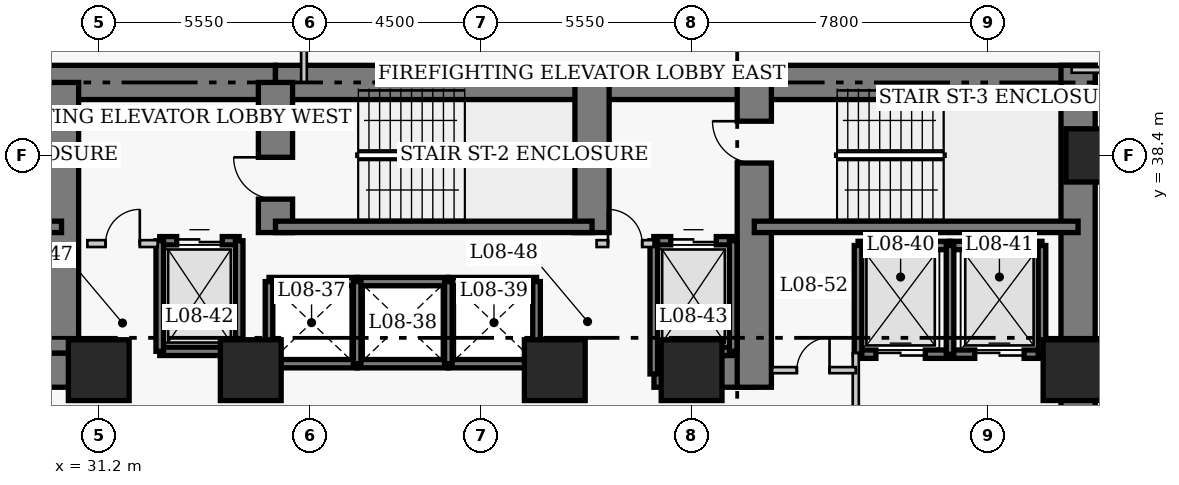
"""IFC4 building model, lengths in metres.
Left out: names, types, materials, properties, quantities, classifications, styles, units other than length and angle.
Written with IfcOpenShell. Run it as: python <this file> out.ifc"""

import sys

from ifc_helpers import new_model, si_unit, direction, frame, frame_2d, origin, origin_2d, place, context, subcontext, project, spatial, rectangle, extrude, element, fill, save


model = new_model("IFC4")
c1 = context("Model", 3, precision=1e-05, world=origin(), true_north=direction((0.0, 1.0)))
c2 = subcontext(c1, "Body", "Model", "MODEL_VIEW")
j1 = project(units=[si_unit("LENGTHUNIT", "METRE"), si_unit("PLANEANGLEUNIT", "RADIAN")], contexts=[c1])
p1 = place(None, origin())
s1 = spatial("IfcSite", under=j1, at=p1, CompositionType="ELEMENT")
p2 = place(p1, origin())
s2 = spatial("IfcBuilding", under=s1, at=p2, CompositionType="ELEMENT")
p3 = place(p2, frame((0.0, 0.0, 37.4)))
s3 = spatial("IfcBuildingStorey", under=s2, at=p3, CompositionType="ELEMENT", Elevation=37.4)
p4 = place(p3, frame((21.45, 40.32, 0.0), z_axis=(0.0, 0.0, 1.0), x_axis=(1.0, 0.0, 0.0)))
e1 = element("IfcWall", 1, at=p4, inside=s3, PredefinedType="SHEAR", context=c2, shape_type="SweptSolid", body=[
    extrude(rectangle(XDim=14.4, YDim=0.9, at=frame_2d((7.2, 0.0))), origin(), (0.0, 0.0, 1.0), 3.8),
])
p5 = place(p3, frame((35.85, 40.32, 0.0), z_axis=(0.0, 0.0, 1.0), x_axis=(1.0, 0.0, 0.0)))
e2 = element("IfcWall", 2, at=p5, inside=s3, PredefinedType="SHEAR", context=c2, shape_type="SweptSolid", body=[
    extrude(rectangle(XDim=12.6, YDim=0.9, at=frame_2d((6.3, 0.0))), origin(), (0.0, 0.0, 1.0), 3.8),
])
p6 = place(p3, frame((48.45, 40.32, 0.0), z_axis=(0.0, 0.0, 1.0), x_axis=(1.0, 0.0, 0.0)))
e3 = element("IfcWall", 3, at=p6, inside=s3, PredefinedType="SHEAR", context=c2, shape_type="SweptSolid", body=[
    extrude(rectangle(XDim=8.97, YDim=0.9, at=frame_2d((4.485, 0.0))), origin(), (0.0, 0.0, 1.0), 3.8),
])
p7 = place(p3, frame((56.97, 27.05, 0.0), z_axis=(0.0, 0.0, 1.0), x_axis=(0.0, 1.0, 0.0)))
e4 = element("IfcWall", 4, at=p7, inside=s3, PredefinedType="SHEAR", context=c2, shape_type="SweptSolid", body=[
    extrude(rectangle(XDim=13.72, YDim=0.9, at=frame_2d((6.86, 0.0))), origin(), (0.0, 0.0, 1.0), 3.8),
])
p8 = place(p3, frame((28.45, 32.75, 0.0), z_axis=(0.0, 0.0, 1.0), x_axis=(1.0, 0.0, 0.0)))
e5 = element("IfcWall", 5, at=p8, inside=s3, PredefinedType="SHEAR", context=c2, shape_type="SweptSolid", body=[
    extrude(rectangle(XDim=2.4, YDim=0.9, at=frame_2d((1.2, 0.0))), origin(), (0.0, 0.0, 1.0), 3.8),
])
p9 = place(p3, frame((45.81, 32.75, 0.0), z_axis=(0.0, 0.0, 1.0), x_axis=(1.0, 0.0, 0.0)))
e6 = element("IfcWall", 6, at=p9, inside=s3, PredefinedType="SHEAR", context=c2, shape_type="SweptSolid", body=[
    extrude(rectangle(XDim=2.64, YDim=0.9, at=frame_2d((1.32, 0.0))), origin(), (0.0, 0.0, 1.0), 3.8),
])
p10 = place(p3, frame((30.22, 33.2, 0.0), z_axis=(0.0, 0.0, 1.0), x_axis=(0.0, 1.0, 0.0)))
e7 = element("IfcWall", 7, at=p10, inside=s3, PredefinedType="SHEAR", context=c2, shape_type="SweptSolid", body=[
    extrude(rectangle(XDim=7.12, YDim=0.9, at=frame_2d((3.56, 0.0))), origin(), (0.0, 0.0, 1.0), 3.8),
])
p11 = place(p3, frame((35.85, 36.37, 0.0), z_axis=(0.0, 0.0, 1.0), x_axis=(0.0, 1.0, 0.0)))
e8 = element("IfcWall", 8, at=p11, inside=s3, PredefinedType="SHEAR", context=c2, shape_type="SweptSolid", body=[
    extrude(rectangle(XDim=3.95, YDim=0.9, at=frame_2d((1.975, 0.0))), origin(), (0.0, 0.0, 1.0), 3.8),
])
p12 = place(p11, frame((0.88, 0.0, 0.0)))
e9 = element("IfcOpeningElement", 9, at=p12, cuts=e8, PredefinedType="OPENING", context=c2, shape_type="SweptSolid", body=[
    extrude(rectangle(XDim=1.1, YDim=2.15, at=frame_2d((0.55, 1.075))), frame((0.0, 0.46, 0.0), z_axis=(0.0, -1.0, 0.0), x_axis=(1.0, 0.0, 0.0)), (0.0, 0.0, 1.0), 0.92),
])
p13 = place(p3, frame((44.18, 36.37, 0.0), z_axis=(0.0, 0.0, 1.0), x_axis=(0.0, 1.0, 0.0)))
e10 = element("IfcWall", 10, at=p13, inside=s3, PredefinedType="SHEAR", context=c2, shape_type="SweptSolid", body=[
    extrude(rectangle(XDim=3.95, YDim=0.9, at=frame_2d((1.975, 0.0))), origin(), (0.0, 0.0, 1.0), 3.8),
])
p14 = place(p3, frame((48.45, 32.3, 0.0), z_axis=(0.0, 0.0, 1.0), x_axis=(0.0, 1.0, 0.0)))
e11 = element("IfcWall", 11, at=p14, inside=s3, PredefinedType="SHEAR", context=c2, shape_type="SweptSolid", body=[
    extrude(rectangle(XDim=8.02, YDim=0.9, at=frame_2d((4.01, 0.0))), origin(), (0.0, 0.0, 1.0), 3.8),
])
p15 = place(p14, frame((5.9, 0.0, 0.0)))
e12 = element("IfcOpeningElement", 12, at=p15, cuts=e11, PredefinedType="OPENING", context=c2, shape_type="SweptSolid", body=[
    extrude(rectangle(XDim=1.1, YDim=2.15, at=frame_2d((0.55, 1.075))), frame((0.0, 0.46, 0.0), z_axis=(0.0, -1.0, 0.0), x_axis=(1.0, 0.0, 0.0)), (0.0, 0.0, 1.0), 0.92),
])
p16 = place(p3, frame((21.9, 36.52, 0.0), z_axis=(0.0, 0.0, 1.0), x_axis=(1.0, 0.0, 0.0)))
e13 = element("IfcWall", 13, at=p16, inside=s3, PredefinedType="SHEAR", context=c2, shape_type="SweptSolid", body=[
    extrude(rectangle(XDim=8.32, YDim=0.3, at=frame_2d((4.16, 0.0))), origin(), (0.0, 0.0, 1.0), 3.8),
])
p17 = place(p16, frame((0.9, 0.0, 0.0)))
e14 = element("IfcOpeningElement", 14, at=p17, cuts=e13, PredefinedType="OPENING", context=c2, shape_type="SweptSolid", body=[
    extrude(rectangle(XDim=1.1, YDim=2.15, at=frame_2d((0.55, 1.075))), frame((0.0, 0.16, 0.0), z_axis=(0.0, -1.0, 0.0), x_axis=(1.0, 0.0, 0.0)), (0.0, 0.0, 1.0), 0.32),
])
p18 = place(p3, frame((35.85, 36.52, 0.0), z_axis=(0.0, 0.0, 1.0), x_axis=(1.0, 0.0, 0.0)))
e15 = element("IfcWall", 15, at=p18, inside=s3, PredefinedType="SHEAR", context=c2, shape_type="SweptSolid", body=[
    extrude(rectangle(XDim=8.33, YDim=0.3, at=frame_2d((4.165, 0.0))), origin(), (0.0, 0.0, 1.0), 3.8),
])
p19 = place(p3, frame((48.45, 36.52, 0.0), z_axis=(0.0, 0.0, 1.0), x_axis=(1.0, 0.0, 0.0)))
e16 = element("IfcWall", 16, at=p19, inside=s3, PredefinedType="SHEAR", context=c2, shape_type="SweptSolid", body=[
    extrude(rectangle(XDim=8.52, YDim=0.3, at=frame_2d((4.26, 0.0))), origin(), (0.0, 0.0, 1.0), 3.8),
])
p20 = place(p3, frame((57.35, 38.4, 0.0), z_axis=(0.0, 0.0, 1.0), x_axis=(1.0, 0.0, 0.0)))
e17 = element("IfcColumn", 17, at=p20, inside=s3, PredefinedType="COLUMN", context=c2, shape_type="SweptSolid", body=[
    extrude(rectangle(XDim=1.4, YDim=1.4, at=origin_2d()), origin(), (0.0, 0.0, 1.0), 3.8),
])
for number, where, z_axis, x_axis in (
    (18, (31.2, 32.75, 0.0), (0.0, 0.0, 1.0), (1.0, 0.0, 0.0)),
    (19, (35.2, 32.75, 0.0), (0.0, 0.0, 1.0), (1.0, 0.0, 0.0)),
    (20, (43.2, 32.75, 0.0), (0.0, 0.0, 1.0), (1.0, 0.0, 0.0)),
    (21, (46.8, 32.75, 0.0), (0.0, 0.0, 1.0), (1.0, 0.0, 0.0)),
    (22, (56.85, 32.75, 0.0), (0.0, 0.0, 1.0), (1.0, 0.0, 0.0)),
):
    element("IfcColumn", number, at=place(p3, frame(where, z_axis=z_axis, x_axis=x_axis)), inside=s3, PredefinedType="COLUMN", context=c2, shape_type="SweptSolid", body=[
        extrude(rectangle(XDim=1.6, YDim=1.6, at=origin_2d()), origin(), (0.0, 0.0, 1.0), 3.8),
    ])
for number, where, z_axis, x_axis in (
    (23, (35.68, 35.08, 0.0), (0.0, 0.0, 1.0), (1.0, 0.0, 0.0)),
    (24, (35.68, 32.92, 0.0), (0.0, 0.0, 1.0), (1.0, 0.0, 0.0)),
):
    element("IfcWall", number, at=place(p3, frame(where, z_axis=z_axis, x_axis=x_axis)), inside=s3, PredefinedType="SHEAR", context=c2, shape_type="SweptSolid", body=[
        extrude(rectangle(XDim=2.32, YDim=0.22, at=frame_2d((1.16, 0.0))), origin(), (0.0, 0.0, 1.0), 3.8),
    ])
p21 = place(p3, frame((35.68, 32.92, 0.0), z_axis=(0.0, 0.0, 1.0), x_axis=(0.0, 1.0, 0.0)))
e25 = element("IfcWall", 25, at=p21, inside=s3, PredefinedType="SHEAR", context=c2, shape_type="SweptSolid", body=[
    extrude(rectangle(XDim=2.16, YDim=0.2, at=frame_2d((1.08, 0.0))), origin(), (0.0, 0.0, 1.0), 3.8),
])
for number, where, z_axis, x_axis in (
    (26, (38.0, 35.08, 0.0), (0.0, 0.0, 1.0), (1.0, 0.0, 0.0)),
    (27, (38.0, 32.92, 0.0), (0.0, 0.0, 1.0), (1.0, 0.0, 0.0)),
):
    element("IfcWall", number, at=place(p3, frame(where, z_axis=z_axis, x_axis=x_axis)), inside=s3, PredefinedType="SHEAR", context=c2, shape_type="SweptSolid", body=[
        extrude(rectangle(XDim=2.4, YDim=0.22, at=frame_2d((1.2, 0.0))), origin(), (0.0, 0.0, 1.0), 3.8),
    ])
p22 = place(p3, frame((38.0, 32.92, 0.0), z_axis=(0.0, 0.0, 1.0), x_axis=(0.0, 1.0, 0.0)))
e28 = element("IfcWall", 28, at=p22, inside=s3, PredefinedType="SHEAR", context=c2, shape_type="SweptSolid", body=[
    extrude(rectangle(XDim=2.16, YDim=0.2, at=frame_2d((1.08, 0.0))), origin(), (0.0, 0.0, 1.0), 3.8),
])
for number, where, z_axis, x_axis in (
    (29, (40.4, 35.08, 0.0), (0.0, 0.0, 1.0), (1.0, 0.0, 0.0)),
    (30, (40.4, 32.92, 0.0), (0.0, 0.0, 1.0), (1.0, 0.0, 0.0)),
):
    element("IfcWall", number, at=place(p3, frame(where, z_axis=z_axis, x_axis=x_axis)), inside=s3, PredefinedType="SHEAR", context=c2, shape_type="SweptSolid", body=[
        extrude(rectangle(XDim=2.32, YDim=0.22, at=frame_2d((1.16, 0.0))), origin(), (0.0, 0.0, 1.0), 3.8),
    ])
for number, where, z_axis, x_axis in (
    (31, (40.4, 32.92, 0.0), (0.0, 0.0, 1.0), (0.0, 1.0, 0.0)),
    (32, (42.72, 32.92, 0.0), (0.0, 0.0, 1.0), (0.0, 1.0, 0.0)),
):
    element("IfcWall", number, at=place(p3, frame(where, z_axis=z_axis, x_axis=x_axis)), inside=s3, PredefinedType="SHEAR", context=c2, shape_type="SweptSolid", body=[
        extrude(rectangle(XDim=2.16, YDim=0.2, at=frame_2d((1.08, 0.0))), origin(), (0.0, 0.0, 1.0), 3.8),
    ])
p23 = place(p3, frame((51.18, 36.03, 0.0), z_axis=(0.0, 0.0, 1.0), x_axis=(1.0, 0.0, 0.0)))
e33 = element("IfcWall", 33, at=p23, inside=s3, PredefinedType="SHEAR", context=c2, shape_type="SweptSolid", body=[
    extrude(rectangle(XDim=2.42, YDim=0.22, at=frame_2d((1.21, 0.0))), origin(), (0.0, 0.0, 1.0), 3.8),
])
p24 = place(p3, frame((51.18, 33.17, 0.0), z_axis=(0.0, 0.0, 1.0), x_axis=(1.0, 0.0, 0.0)))
e34 = element("IfcWall", 34, at=p24, inside=s3, PredefinedType="SHEAR", context=c2, shape_type="SweptSolid", body=[
    extrude(rectangle(XDim=2.42, YDim=0.22, at=frame_2d((1.21, 0.0))), origin(), (0.0, 0.0, 1.0), 3.8),
])
p25 = place(p24, frame((0.47, 0.0, 0.0)))
e35 = element("IfcOpeningElement", 35, at=p25, cuts=e34, PredefinedType="OPENING", context=c2, shape_type="SweptSolid", body=[
    extrude(rectangle(XDim=1.3, YDim=2.15, at=frame_2d((0.65, 1.075))), frame((0.0, 0.12, 0.0), z_axis=(0.0, -1.0, 0.0), x_axis=(1.0, 0.0, 0.0)), (0.0, 0.0, 1.0), 0.24),
])
p26 = place(p3, frame((51.18, 33.17, 0.0), z_axis=(0.0, 0.0, 1.0), x_axis=(0.0, 1.0, 0.0)))
e36 = element("IfcWall", 36, at=p26, inside=s3, PredefinedType="SHEAR", context=c2, shape_type="SweptSolid", body=[
    extrude(rectangle(XDim=2.86, YDim=0.2, at=frame_2d((1.43, 0.0))), origin(), (0.0, 0.0, 1.0), 3.8),
])
p27 = place(p3, frame((53.6, 36.03, 0.0), z_axis=(0.0, 0.0, 1.0), x_axis=(1.0, 0.0, 0.0)))
e37 = element("IfcWall", 37, at=p27, inside=s3, PredefinedType="SHEAR", context=c2, shape_type="SweptSolid", body=[
    extrude(rectangle(XDim=2.42, YDim=0.22, at=frame_2d((1.21, 0.0))), origin(), (0.0, 0.0, 1.0), 3.8),
])
p28 = place(p3, frame((53.6, 33.17, 0.0), z_axis=(0.0, 0.0, 1.0), x_axis=(1.0, 0.0, 0.0)))
e38 = element("IfcWall", 38, at=p28, inside=s3, PredefinedType="SHEAR", context=c2, shape_type="SweptSolid", body=[
    extrude(rectangle(XDim=2.42, YDim=0.22, at=frame_2d((1.21, 0.0))), origin(), (0.0, 0.0, 1.0), 3.8),
])
p29 = place(p28, frame((0.65, 0.0, 0.0)))
e39 = element("IfcOpeningElement", 39, at=p29, cuts=e38, PredefinedType="OPENING", context=c2, shape_type="SweptSolid", body=[
    extrude(rectangle(XDim=1.3, YDim=2.15, at=frame_2d((0.65, 1.075))), frame((0.0, 0.12, 0.0), z_axis=(0.0, -1.0, 0.0), x_axis=(1.0, 0.0, 0.0)), (0.0, 0.0, 1.0), 0.24),
])
for number, where, z_axis, x_axis in (
    (40, (53.6, 33.17, 0.0), (0.0, 0.0, 1.0), (0.0, 1.0, 0.0)),
    (41, (56.02, 33.17, 0.0), (0.0, 0.0, 1.0), (0.0, 1.0, 0.0)),
):
    element("IfcWall", number, at=place(p3, frame(where, z_axis=z_axis, x_axis=x_axis)), inside=s3, PredefinedType="SHEAR", context=c2, shape_type="SweptSolid", body=[
        extrude(rectangle(XDim=2.86, YDim=0.2, at=frame_2d((1.43, 0.0))), origin(), (0.0, 0.0, 1.0), 3.8),
    ])
p30 = place(p3, frame((32.805, 36.155, 0.0), z_axis=(0.0, 0.0, 1.0), x_axis=(1.0, 0.0, 0.0)))
e42 = element("IfcWall", 42, at=p30, inside=s3, PredefinedType="SHEAR", context=c2, shape_type="SweptSolid", body=[
    extrude(rectangle(XDim=2.09, YDim=0.22, at=frame_2d((1.045, 0.0))), origin(), (0.0, 0.0, 1.0), 3.8),
])
p31 = place(p30, frame((0.445, 0.0, 0.0)))
e43 = element("IfcOpeningElement", 43, at=p31, cuts=e42, PredefinedType="OPENING", context=c2, shape_type="SweptSolid", body=[
    extrude(rectangle(XDim=1.2, YDim=2.15, at=frame_2d((0.6, 1.075))), frame((0.0, 0.12, 0.0), z_axis=(0.0, -1.0, 0.0), x_axis=(1.0, 0.0, 0.0)), (0.0, 0.0, 1.0), 0.24),
])
p32 = place(p3, frame((32.805, 33.245, 0.0), z_axis=(0.0, 0.0, 1.0), x_axis=(1.0, 0.0, 0.0)))
e44 = element("IfcWall", 44, at=p32, inside=s3, PredefinedType="SHEAR", context=c2, shape_type="SweptSolid", body=[
    extrude(rectangle(XDim=2.09, YDim=0.22, at=frame_2d((1.045, 0.0))), origin(), (0.0, 0.0, 1.0), 3.8),
])
for number, where, z_axis, x_axis in (
    (45, (32.805, 33.245, 0.0), (0.0, 0.0, 1.0), (0.0, 1.0, 0.0)),
    (46, (34.895, 33.245, 0.0), (0.0, 0.0, 1.0), (0.0, 1.0, 0.0)),
):
    element("IfcWall", number, at=place(p3, frame(where, z_axis=z_axis, x_axis=x_axis)), inside=s3, PredefinedType="SHEAR", context=c2, shape_type="SweptSolid", body=[
        extrude(rectangle(XDim=2.91, YDim=0.2, at=frame_2d((1.455, 0.0))), origin(), (0.0, 0.0, 1.0), 3.8),
    ])
p33 = place(p3, frame((45.805, 36.155, 0.0), z_axis=(0.0, 0.0, 1.0), x_axis=(1.0, 0.0, 0.0)))
e47 = element("IfcWall", 47, at=p33, inside=s3, PredefinedType="SHEAR", context=c2, shape_type="SweptSolid", body=[
    extrude(rectangle(XDim=2.09, YDim=0.22, at=frame_2d((1.045, 0.0))), origin(), (0.0, 0.0, 1.0), 3.8),
])
p34 = place(p33, frame((0.445, 0.0, 0.0)))
e48 = element("IfcOpeningElement", 48, at=p34, cuts=e47, PredefinedType="OPENING", context=c2, shape_type="SweptSolid", body=[
    extrude(rectangle(XDim=1.2, YDim=2.15, at=frame_2d((0.6, 1.075))), frame((0.0, 0.12, 0.0), z_axis=(0.0, -1.0, 0.0), x_axis=(1.0, 0.0, 0.0)), (0.0, 0.0, 1.0), 0.24),
])
p35 = place(p3, frame((45.805, 33.245, 0.0), z_axis=(0.0, 0.0, 1.0), x_axis=(1.0, 0.0, 0.0)))
e49 = element("IfcWall", 49, at=p35, inside=s3, PredefinedType="SHEAR", context=c2, shape_type="SweptSolid", body=[
    extrude(rectangle(XDim=2.09, YDim=0.22, at=frame_2d((1.045, 0.0))), origin(), (0.0, 0.0, 1.0), 3.8),
])
p36 = place(p3, frame((45.805, 32.65, 0.0), z_axis=(0.0, 0.0, 1.0), x_axis=(0.0, 1.0, 0.0)))
e50 = element("IfcWall", 50, at=p36, inside=s3, PredefinedType="SHEAR", context=c2, shape_type="SweptSolid", body=[
    extrude(rectangle(XDim=3.505, YDim=0.2, at=frame_2d((1.752, 0.0))), origin(), (0.0, 0.0, 1.0), 3.8),
])
p37 = place(p3, frame((47.895, 33.245, 0.0), z_axis=(0.0, 0.0, 1.0), x_axis=(0.0, 1.0, 0.0)))
e51 = element("IfcWall", 51, at=p37, inside=s3, PredefinedType="SHEAR", context=c2, shape_type="SweptSolid", body=[
    extrude(rectangle(XDim=2.91, YDim=0.2, at=frame_2d((1.455, 0.0))), origin(), (0.0, 0.0, 1.0), 3.8),
])
p38 = place(p3, frame((30.9, 36.08, 0.0), z_axis=(0.0, 0.0, 1.0), x_axis=(1.0, 0.0, 0.0)))
e52 = element("IfcWall", 52, at=p38, inside=s3, PredefinedType="PARTITIONING", context=c2, shape_type="SweptSolid", body=[
    extrude(rectangle(XDim=1.85, YDim=0.18, at=frame_2d((0.925, 0.0))), origin(), (0.0, 0.0, 1.0), 3.54),
])
p39 = place(p38, frame((0.48, 0.0, 0.0)))
e53 = element("IfcOpeningElement", 53, at=p39, cuts=e52, PredefinedType="OPENING", context=c2, shape_type="SweptSolid", body=[
    extrude(rectangle(XDim=0.9, YDim=2.15, at=frame_2d((0.45, 1.075))), frame((0.0, 0.1, 0.0), z_axis=(0.0, -1.0, 0.0), x_axis=(1.0, 0.0, 0.0)), (0.0, 0.0, 1.0), 0.2),
])
p40 = place(p3, frame((44.3, 36.08, 0.0), z_axis=(0.0, 0.0, 1.0), x_axis=(1.0, 0.0, 0.0)))
e54 = element("IfcWall", 54, at=p40, inside=s3, PredefinedType="PARTITIONING", context=c2, shape_type="SweptSolid", body=[
    extrude(rectangle(XDim=1.5, YDim=0.18, at=frame_2d((0.75, 0.0))), origin(), (0.0, 0.0, 1.0), 3.54),
])
p41 = place(p40, frame((0.3, 0.0, 0.0)))
e55 = element("IfcOpeningElement", 55, at=p41, cuts=e54, PredefinedType="OPENING", context=c2, shape_type="SweptSolid", body=[
    extrude(rectangle(XDim=0.9, YDim=2.15, at=frame_2d((0.45, 1.075))), frame((0.0, 0.1, 0.0), z_axis=(0.0, -1.0, 0.0), x_axis=(1.0, 0.0, 0.0)), (0.0, 0.0, 1.0), 0.2),
])
p42 = place(p3, frame((51.12, 29.5, 0.0), z_axis=(0.0, 0.0, 1.0), x_axis=(0.0, 1.0, 0.0)))
e56 = element("IfcWall", 56, at=p42, inside=s3, PredefinedType="PARTITIONING", context=c2, shape_type="SweptSolid", body=[
    extrude(rectangle(XDim=3.7, YDim=0.16, at=frame_2d((1.85, 0.0))), origin(), (0.0, 0.0, 1.0), 3.54),
])
p43 = place(p42, frame((0.9, 0.0, 0.0)))
e57 = element("IfcOpeningElement", 57, at=p43, cuts=e56, PredefinedType="OPENING", context=c2, shape_type="SweptSolid", body=[
    extrude(rectangle(XDim=1.1, YDim=2.15, at=frame_2d((0.55, 1.075))), frame((0.0, 0.09, 0.0), z_axis=(0.0, -1.0, 0.0), x_axis=(1.0, 0.0, 0.0)), (0.0, 0.0, 1.0), 0.18),
])
p44 = place(p3, frame((48.92, 32.75, 0.0), z_axis=(0.0, 0.0, 1.0), x_axis=(1.0, 0.0, 0.0)))
e58 = element("IfcWall", 58, at=p44, inside=s3, PredefinedType="PARTITIONING", context=c2, shape_type="SweptSolid", body=[
    extrude(rectangle(XDim=2.2, YDim=0.16, at=frame_2d((1.1, 0.0))), origin(), (0.0, 0.0, 1.0), 3.54),
])
p45 = place(p44, frame((0.65, 0.0, 0.0)))
e59 = element("IfcOpeningElement", 59, at=p45, cuts=e58, PredefinedType="OPENING", context=c2, shape_type="SweptSolid", body=[
    extrude(rectangle(XDim=0.86, YDim=2.05, at=frame_2d((0.43, 1.025))), frame((0.0, 0.09, 0.0), z_axis=(0.0, -1.0, 0.0), x_axis=(1.0, 0.0, 0.0)), (0.0, 0.0, 1.0), 0.18),
])
p46 = place(p3, frame((56.8, 40.65, 0.0), z_axis=(0.0, 0.0, 1.0), x_axis=(1.0, 0.0, 0.0)))
e60 = element("IfcWall", 60, at=p46, inside=s3, PredefinedType="PARTITIONING", context=c2, shape_type="SweptSolid", body=[
    extrude(rectangle(XDim=4.01, YDim=0.15, at=frame_2d((2.005, 0.0))), origin(), (0.0, 0.0, 1.0), 3.54),
])
p47 = place(p46, frame((2.4, 0.0, 0.0)))
e61 = element("IfcOpeningElement", 61, at=p47, cuts=e60, PredefinedType="OPENING", context=c2, shape_type="SweptSolid", body=[
    extrude(rectangle(XDim=1.0, YDim=2.15, at=frame_2d((0.5, 1.075))), frame((0.0, 0.085, 0.0), z_axis=(0.0, -1.0, 0.0), x_axis=(1.0, 0.0, 0.0)), (0.0, 0.0, 1.0), 0.17),
])
p48 = place(p3, frame((36.6, 40.32, 0.0), z_axis=(0.0, 0.0, 1.0), x_axis=(0.0, 1.0, 0.0)))
e62 = element("IfcWall", 62, at=p48, inside=s3, PredefinedType="PARTITIONING", context=c2, shape_type="SweptSolid", body=[
    extrude(rectangle(XDim=5.045, YDim=0.15, at=frame_2d((2.522, 0.0))), origin(), (0.0, 0.0, 1.0), 3.54),
])
p49 = place(p25, origin())
e63 = element("IfcDoor", 63, at=p49, inside=s3, OperationType="DOUBLE_DOOR_SLIDING", PredefinedType="DOOR", context=c2, shape_type="SweptSolid", body=[
    extrude(rectangle(XDim=1.3, YDim=2.15, at=frame_2d((0.65, 1.075))), frame((0.0, 0.025, 0.0), z_axis=(0.0, -1.0, 0.0), x_axis=(1.0, 0.0, 0.0)), (0.0, 0.0, 1.0), 0.05),
])
fill(e35, e63)
p50 = place(p29, origin())
e64 = element("IfcDoor", 64, at=p50, inside=s3, OperationType="DOUBLE_DOOR_SLIDING", PredefinedType="DOOR", context=c2, shape_type="SweptSolid", body=[
    extrude(rectangle(XDim=1.3, YDim=2.15, at=frame_2d((0.65, 1.075))), frame((0.0, 0.025, 0.0), z_axis=(0.0, -1.0, 0.0), x_axis=(1.0, 0.0, 0.0)), (0.0, 0.0, 1.0), 0.05),
])
fill(e39, e64)
p51 = place(p31, origin())
e65 = element("IfcDoor", 65, at=p51, inside=s3, OperationType="DOUBLE_DOOR_SLIDING", PredefinedType="DOOR", context=c2, shape_type="SweptSolid", body=[
    extrude(rectangle(XDim=1.2, YDim=2.15, at=frame_2d((0.6, 1.075))), frame((0.0, 0.025, 0.0), z_axis=(0.0, -1.0, 0.0), x_axis=(1.0, 0.0, 0.0)), (0.0, 0.0, 1.0), 0.05),
])
fill(e43, e65)
p52 = place(p34, origin())
e66 = element("IfcDoor", 66, at=p52, inside=s3, OperationType="DOUBLE_DOOR_SLIDING", PredefinedType="DOOR", context=c2, shape_type="SweptSolid", body=[
    extrude(rectangle(XDim=1.2, YDim=2.15, at=frame_2d((0.6, 1.075))), frame((0.0, 0.025, 0.0), z_axis=(0.0, -1.0, 0.0), x_axis=(1.0, 0.0, 0.0)), (0.0, 0.0, 1.0), 0.05),
])
fill(e48, e66)
p53 = place(p39, origin())
e67 = element("IfcDoor", 67, at=p53, inside=s3, OperationType="SINGLE_SWING_RIGHT", PredefinedType="DOOR", context=c2, shape_type="SweptSolid", body=[
    extrude(rectangle(XDim=0.9, YDim=2.15, at=frame_2d((0.45, 1.075))), frame((0.0, 0.025, 0.0), z_axis=(0.0, -1.0, 0.0), x_axis=(1.0, 0.0, 0.0)), (0.0, 0.0, 1.0), 0.05),
])
fill(e53, e67)
p54 = place(p41, origin())
e68 = element("IfcDoor", 68, at=p54, inside=s3, OperationType="SINGLE_SWING_LEFT", PredefinedType="DOOR", context=c2, shape_type="SweptSolid", body=[
    extrude(rectangle(XDim=0.9, YDim=2.15, at=frame_2d((0.45, 1.075))), frame((0.0, 0.025, 0.0), z_axis=(0.0, -1.0, 0.0), x_axis=(1.0, 0.0, 0.0)), (0.0, 0.0, 1.0), 0.05),
])
fill(e55, e68)
p55 = place(p45, origin())
e69 = element("IfcDoor", 69, at=p55, inside=s3, OperationType="SINGLE_SWING_RIGHT", PredefinedType="DOOR", context=c2, shape_type="SweptSolid", body=[
    extrude(rectangle(XDim=0.86, YDim=2.05, at=frame_2d((0.43, 1.025))), frame((0.0, 0.025, 0.0), z_axis=(0.0, -1.0, 0.0), x_axis=(1.0, 0.0, 0.0)), (0.0, 0.0, 1.0), 0.05),
])
fill(e59, e69)
p56 = place(p12, origin())
e70 = element("IfcDoor", 70, at=p56, inside=s3, OperationType="SINGLE_SWING_RIGHT", PredefinedType="DOOR", context=c2, shape_type="SweptSolid", body=[
    extrude(rectangle(XDim=1.1, YDim=2.15, at=frame_2d((0.55, 1.075))), frame((0.0, 0.025, 0.0), z_axis=(0.0, -1.0, 0.0), x_axis=(1.0, 0.0, 0.0)), (0.0, 0.0, 1.0), 0.05),
])
fill(e9, e70)
p57 = place(p15, origin())
e71 = element("IfcDoor", 71, at=p57, inside=s3, OperationType="SINGLE_SWING_RIGHT", PredefinedType="DOOR", context=c2, shape_type="SweptSolid", body=[
    extrude(rectangle(XDim=1.1, YDim=2.15, at=frame_2d((0.55, 1.075))), frame((0.0, 0.025, 0.0), z_axis=(0.0, -1.0, 0.0), x_axis=(1.0, 0.0, 0.0)), (0.0, 0.0, 1.0), 0.05),
])
fill(e12, e71)
save(model, sys.argv[1])
